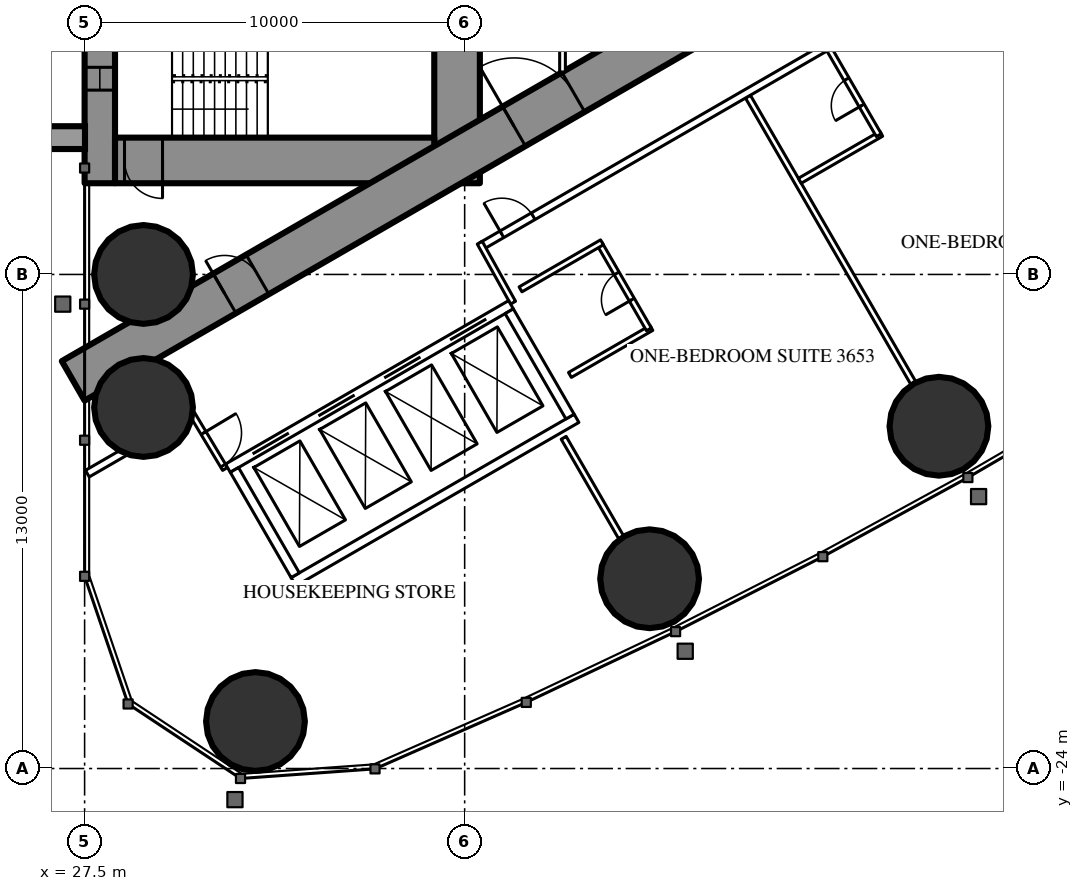
"""IFC4 building model, lengths in metres.
Left out: names, types, materials, properties, quantities, classifications, styles, units other than length and angle.
Written with IfcOpenShell. Run it as: python <this file> out.ifc"""

import sys

from ifc_helpers import new_model, si_unit, direction, frame, frame_2d, origin, origin_2d, place, context, subcontext, project, spatial, rectangle, hollow_circle, extrude, element, fill, save


model = new_model("IFC4")
c1 = context("Model", 3, precision=1e-05, world=origin(), true_north=direction((0.0, 1.0)))
c2 = subcontext(c1, "Body", "Model", "MODEL_VIEW")
j1 = project(units=[si_unit("LENGTHUNIT", "METRE"), si_unit("PLANEANGLEUNIT", "RADIAN")], contexts=[c1])
p1 = place(None, origin())
s1 = spatial("IfcSite", under=j1, at=p1, CompositionType="ELEMENT")
p2 = place(p1, origin())
s2 = spatial("IfcBuilding", under=s1, at=p2, CompositionType="ELEMENT")
p3 = place(p2, frame((0.0, 0.0, 136.1)))
s3 = spatial("IfcBuildingStorey", under=s2, at=p3, CompositionType="ELEMENT", Elevation=136.1)
for number, where, z_axis, x_axis in (
    (1, (31.996, -22.763, 0.0), (0.0, 0.0, 1.0), (1.0, 0.0, 0.0)),
    (2, (29.05, -11.0, 0.0), (0.0, 0.0, 1.0), (1.0, 0.0, 0.0)),
    (3, (29.05, -14.5, 0.0), (0.0, 0.0, 1.0), (1.0, 0.0, 0.0)),
    (4, (42.366, -19.007, 0.0), (0.0, 0.0, 1.0), (1.0, 0.0, 0.0)),
    (5, (49.979, -14.994, 0.0), (0.0, 0.0, 1.0), (1.0, 0.0, 0.0)),
):
    element("IfcColumn", number, at=place(p3, frame(where, z_axis=z_axis, x_axis=x_axis)), inside=s3, PredefinedType="COLUMN", context=c2, shape_type="SweptSolid", body=[
        extrude(hollow_circle(Radius=1.3, WallThickness=0.1, at=origin_2d()), origin(), (0.0, 0.0, 1.0), 3.5),
    ])
p4 = place(p3, frame((27.9, -8.6, 0.0), z_axis=(0.0, 0.0, 1.0), x_axis=(0.0, 1.0, 0.0)))
e6 = element("IfcWall", 6, at=p4, inside=s3, PredefinedType="SHEAR", context=c2, shape_type="SweptSolid", body=[
    extrude(rectangle(XDim=17.2, YDim=0.8, at=frame_2d((8.6, 0.0))), origin(), (0.0, 0.0, 1.0), 3.5),
])
p5 = place(p4, frame((2.45, 0.0, 0.6)))
e7 = element("IfcOpeningElement", 7, at=p5, cuts=e6, PredefinedType="OPENING", context=c2, shape_type="SweptSolid", body=[
    extrude(rectangle(XDim=0.6, YDim=2.1, at=frame_2d((0.3, 1.05))), frame((0.0, 0.41, 0.0), z_axis=(0.0, -1.0, 0.0), x_axis=(1.0, 0.0, 0.0)), (0.0, 0.0, 1.0), 0.82),
])
p6 = place(p4, frame((14.15, 0.0, 0.6)))
e8 = element("IfcOpeningElement", 8, at=p6, cuts=e6, PredefinedType="OPENING", context=c2, shape_type="SweptSolid", body=[
    extrude(rectangle(XDim=0.6, YDim=2.1, at=frame_2d((0.3, 1.05))), frame((0.0, 0.41, 0.0), z_axis=(0.0, -1.0, 0.0), x_axis=(1.0, 0.0, 0.0)), (0.0, 0.0, 1.0), 0.82),
])
p7 = place(p3, frame((37.3, -8.6, 0.0), z_axis=(0.0, 0.0, 1.0), x_axis=(0.0, 1.0, 0.0)))
e9 = element("IfcWall", 9, at=p7, inside=s3, PredefinedType="SHEAR", context=c2, shape_type="SweptSolid", body=[
    extrude(rectangle(XDim=17.2, YDim=1.2, at=frame_2d((8.6, 0.0))), origin(), (0.0, 0.0, 1.0), 3.5),
])
p8 = place(p7, frame((7.7, 0.0, 0.0)))
e10 = element("IfcOpeningElement", 10, at=p8, cuts=e9, PredefinedType="OPENING", context=c2, shape_type="SweptSolid", body=[
    extrude(rectangle(XDim=1.8, YDim=2.2, at=frame_2d((0.9, 1.1))), frame((0.0, 0.61, 0.0), z_axis=(0.0, -1.0, 0.0), x_axis=(1.0, 0.0, 0.0)), (0.0, 0.0, 1.0), 1.22),
])
p9 = place(p3, frame((28.3, -8.0, 0.0), z_axis=(0.0, 0.0, 1.0), x_axis=(1.0, 0.0, 0.0)))
e11 = element("IfcWall", 11, at=p9, inside=s3, PredefinedType="SHEAR", context=c2, shape_type="SweptSolid", body=[
    extrude(rectangle(XDim=8.4, YDim=1.2, at=frame_2d((4.2, 0.0))), origin(), (0.0, 0.0, 1.0), 3.5),
])
p10 = place(p9, frame((0.25, 0.0, 0.0)))
e12 = element("IfcOpeningElement", 12, at=p10, cuts=e11, PredefinedType="OPENING", context=c2, shape_type="SweptSolid", body=[
    extrude(rectangle(XDim=1.0, YDim=2.2, at=frame_2d((0.5, 1.1))), frame((0.0, 0.61, 0.0), z_axis=(0.0, -1.0, 0.0), x_axis=(1.0, 0.0, 0.0)), (0.0, 0.0, 1.0), 1.22),
])
p11 = place(p3, frame((27.2, -13.8, 0.0), z_axis=(0.0, 0.0, 1.0), x_axis=(0.866027159892, 0.499996958321, 0.0)))
e13 = element("IfcWall", 13, at=p11, inside=s3, PredefinedType="SHEAR", context=c2, shape_type="SweptSolid", body=[
    extrude(rectangle(XDim=27.947, YDim=1.2, at=frame_2d((13.973, 0.0))), origin(), (0.0, 0.0, 1.0), 3.5),
])
p12 = place(p11, frame((4.6, 0.0, 0.0)))
e14 = element("IfcOpeningElement", 14, at=p12, cuts=e13, PredefinedType="OPENING", context=c2, shape_type="SweptSolid", body=[
    extrude(rectangle(XDim=1.0, YDim=2.2, at=frame_2d((0.5, 1.1))), frame((0.0, 0.61, 0.0), z_axis=(0.0, -1.0, 0.0), x_axis=(1.0, 0.0, 0.0)), (0.0, 0.0, 1.0), 1.22),
])
p13 = place(p11, frame((13.395, 0.0, 0.0)))
e15 = element("IfcOpeningElement", 15, at=p13, cuts=e13, PredefinedType="OPENING", context=c2, shape_type="SweptSolid", body=[
    extrude(rectangle(XDim=1.8, YDim=2.2, at=frame_2d((0.9, 1.1))), frame((0.0, 0.61, 0.0), z_axis=(0.0, -1.0, 0.0), x_axis=(1.0, 0.0, 0.0)), (0.0, 0.0, 1.0), 1.22),
])
p14 = place(p3, frame((44.954, -6.321, 0.0), z_axis=(0.0, 0.0, 1.0), x_axis=(0.500018676722, -0.866014620505, 0.0)))
e16 = element("IfcWall", 16, at=p14, inside=s3, PredefinedType="PARTITIONING", context=c2, shape_type="SweptSolid", body=[
    extrude(rectangle(XDim=8.704, YDim=0.15, at=frame_2d((4.352, 0.0))), origin(), (0.0, 0.0, 1.0), 2.2),
])
p15 = place(p3, frame((40.105, -15.299, 0.0), z_axis=(0.0, 0.0, 1.0), x_axis=(0.499978822259, -0.866037630414, 0.0)))
e17 = element("IfcWall", 17, at=p15, inside=s3, PredefinedType="PARTITIONING", context=c2, shape_type="SweptSolid", body=[
    extrude(rectangle(XDim=3.023, YDim=0.15, at=frame_2d((1.511, 0.0))), origin(), (0.0, 0.0, 1.0), 3.25),
])
p16 = place(p3, frame((27.572, -16.241, 0.0), z_axis=(0.0, 0.0, 1.0), x_axis=(0.866029654818, 0.499992636921, 0.0)))
e18 = element("IfcWall", 18, at=p16, inside=s3, PredefinedType="PARTITIONING", context=c2, shape_type="SweptSolid", body=[
    extrude(rectangle(XDim=3.155, YDim=0.2, at=frame_2d((1.577, 0.0))), origin(), (0.0, 0.0, 1.0), 3.25),
])
p17 = place(p3, frame((37.96, -10.243, 0.0), z_axis=(0.0, 0.0, 1.0), x_axis=(0.866026429433, 0.499998223521, 0.0)))
e19 = element("IfcWall", 19, at=p17, inside=s3, PredefinedType="PARTITIONING", context=c2, shape_type="SweptSolid", body=[
    extrude(rectangle(XDim=20.487, YDim=0.2, at=frame_2d((10.243, 0.0))), origin(), (0.0, 0.0, 1.0), 3.25),
])
p18 = place(p17, frame((10.743, 0.0, 0.0)))
e20 = element("IfcOpeningElement", 20, at=p18, cuts=e19, PredefinedType="OPENING", context=c2, shape_type="SweptSolid", body=[
    extrude(rectangle(XDim=0.95, YDim=2.2, at=frame_2d((0.475, 1.1))), frame((0.0, 0.11, 0.0), z_axis=(0.0, -1.0, 0.0), x_axis=(1.0, 0.0, 0.0)), (0.0, 0.0, 1.0), 0.22),
])
p19 = place(p17, frame((17.586, 0.0, 0.0)))
e21 = element("IfcOpeningElement", 21, at=p19, cuts=e19, PredefinedType="OPENING", context=c2, shape_type="SweptSolid", body=[
    extrude(rectangle(XDim=1.8, YDim=2.2, at=frame_2d((0.9, 1.1))), frame((0.0, 0.11, 0.0), z_axis=(0.0, -1.0, 0.0), x_axis=(1.0, 0.0, 0.0)), (0.0, 0.0, 1.0), 0.22),
])
p20 = place(p17, frame((0.6, 0.0, 0.0)))
e22 = element("IfcOpeningElement", 22, at=p20, cuts=e19, PredefinedType="OPENING", context=c2, shape_type="SweptSolid", body=[
    extrude(rectangle(XDim=0.95, YDim=2.2, at=frame_2d((0.475, 1.1))), frame((0.0, 0.11, 0.0), z_axis=(0.0, -1.0, 0.0), x_axis=(1.0, 0.0, 0.0)), (0.0, 0.0, 1.0), 0.22),
])
p21 = place(p3, frame((38.773, -11.742, 0.0), z_axis=(0.0, 0.0, 1.0), x_axis=(-0.485528096672, 0.8742210632, 0.0)))
e23 = element("IfcWall", 23, at=p21, inside=s3, PredefinedType="PARTITIONING", context=c2, shape_type="SweptSolid", body=[
    extrude(rectangle(XDim=1.805, YDim=0.15, at=frame_2d((0.903, 0.0))), origin(), (0.0, 0.0, 1.0), 3.25),
])
p22 = place(p3, frame((30.267, -14.569, 0.0), z_axis=(0.0, 0.0, 1.0), x_axis=(0.514336634837, -0.857588377991, 0.0)))
e24 = element("IfcWall", 24, at=p22, inside=s3, PredefinedType="PARTITIONING", context=c2, shape_type="SweptSolid", body=[
    extrude(rectangle(XDim=1.805, YDim=0.15, at=frame_2d((0.903, 0.0))), origin(), (0.0, 0.0, 1.0), 3.25),
])
p23 = place(p22, frame((0.703, 0.0, 0.0)))
e25 = element("IfcOpeningElement", 25, at=p23, cuts=e24, PredefinedType="OPENING", context=c2, shape_type="SweptSolid", body=[
    extrude(rectangle(XDim=1.0, YDim=2.2, at=frame_2d((0.5, 1.1))), frame((0.0, 0.085, 0.0), z_axis=(0.0, -1.0, 0.0), x_axis=(1.0, 0.0, 0.0)), (0.0, 0.0, 1.0), 0.17),
])
p24 = place(p3, frame((46.319, -8.535, 0.0), z_axis=(0.0, 0.0, 1.0), x_axis=(0.866006523861, 0.500032699561, 0.0)))
e26 = element("IfcWall", 26, at=p24, inside=s3, PredefinedType="PARTITIONING", context=c2, shape_type="SweptSolid", body=[
    extrude(rectangle(XDim=2.475, YDim=0.15, at=frame_2d((1.237, 0.0))), origin(), (0.0, 0.0, 1.0), 3.25),
])
p25 = place(p3, frame((47.097, -5.084, 0.0), z_axis=(0.0, 0.0, 1.0), x_axis=(0.500006934395, -0.866021400173, 0.0)))
e27 = element("IfcWall", 27, at=p25, inside=s3, PredefinedType="PARTITIONING", context=c2, shape_type="SweptSolid", body=[
    extrude(rectangle(XDim=2.6, YDim=0.15, at=frame_2d((1.3, 0.0))), origin(), (0.0, 0.0, 1.0), 3.25),
])
p26 = place(p25, frame((0.9, 0.0, 0.0)))
e28 = element("IfcOpeningElement", 28, at=p26, cuts=e27, PredefinedType="OPENING", context=c2, shape_type="SweptSolid", body=[
    extrude(rectangle(XDim=0.8, YDim=2.2, at=frame_2d((0.4, 1.1))), frame((0.0, 0.085, 0.0), z_axis=(0.0, -1.0, 0.0), x_axis=(1.0, 0.0, 0.0)), (0.0, 0.0, 1.0), 0.17),
])
p27 = place(p3, frame((40.27, -13.644, 0.0), z_axis=(0.0, 0.0, 1.0), x_axis=(0.866031185235, 0.4999899861, 0.0)))
e29 = element("IfcWall", 29, at=p27, inside=s3, PredefinedType="PARTITIONING", context=c2, shape_type="SweptSolid", body=[
    extrude(rectangle(XDim=2.475, YDim=0.15, at=frame_2d((1.238, 0.0))), origin(), (0.0, 0.0, 1.0), 3.25),
])
p28 = place(p3, frame((41.048, -10.193, 0.0), z_axis=(0.0, 0.0, 1.0), x_axis=(0.500047596559, -0.865997922154, 0.0)))
e30 = element("IfcWall", 30, at=p28, inside=s3, PredefinedType="PARTITIONING", context=c2, shape_type="SweptSolid", body=[
    extrude(rectangle(XDim=2.6, YDim=0.15, at=frame_2d((1.3, 0.0))), origin(), (0.0, 0.0, 1.0), 3.25),
])
p29 = place(p28, frame((0.9, 0.0, 0.0)))
e31 = element("IfcOpeningElement", 31, at=p29, cuts=e30, PredefinedType="OPENING", context=c2, shape_type="SweptSolid", body=[
    extrude(rectangle(XDim=0.8, YDim=2.2, at=frame_2d((0.4, 1.1))), frame((0.0, 0.085, 0.0), z_axis=(0.0, -1.0, 0.0), x_axis=(1.0, 0.0, 0.0)), (0.0, 0.0, 1.0), 0.17),
])
p30 = place(p3, frame((38.97, -11.393, 0.0), z_axis=(0.0, 0.0, 1.0), x_axis=(0.866031185235, 0.4999899861, 0.0)))
e32 = element("IfcWall", 32, at=p30, inside=s3, PredefinedType="PARTITIONING", context=c2, shape_type="SweptSolid", body=[
    extrude(rectangle(XDim=2.475, YDim=0.15, at=frame_2d((1.238, 0.0))), origin(), (0.0, 0.0, 1.0), 3.25),
])
p31 = place(p3, frame((40.075, -5.674, 0.0), z_axis=(0.0, 0.0, 1.0), x_axis=(0.0, 1.0, 0.0)))
e33 = element("IfcWall", 33, at=p31, inside=s3, PredefinedType="PARTITIONING", context=c2, shape_type="SweptSolid", body=[
    extrude(rectangle(XDim=6.874, YDim=0.15, at=frame_2d((3.437, 0.0))), origin(), (0.0, 0.0, 1.0), 3.25),
])
p32 = place(p31, frame((2.537, 0.0, 0.0)))
e34 = element("IfcOpeningElement", 34, at=p32, cuts=e33, PredefinedType="OPENING", context=c2, shape_type="SweptSolid", body=[
    extrude(rectangle(XDim=1.8, YDim=2.2, at=frame_2d((0.9, 1.1))), frame((0.0, 0.085, 0.0), z_axis=(0.0, -1.0, 0.0), x_axis=(1.0, 0.0, 0.0)), (0.0, 0.0, 1.0), 0.17),
])
p33 = place(p3, frame((31.271, -16.097, 0.0), z_axis=(0.0, 0.0, 1.0), x_axis=(0.86604045752, 0.499973925258, 0.0)))
e35 = element("IfcWall", 35, at=p33, inside=s3, PredefinedType="PARTITIONING", context=c2, shape_type="SweptSolid", body=[
    extrude(rectangle(XDim=8.6, YDim=0.25, at=frame_2d((4.3, 0.0))), origin(), (0.0, 0.0, 1.0), 3.25),
])
p34 = place(p33, frame((0.75, 0.0, 0.0)))
e36 = element("IfcOpeningElement", 36, at=p34, cuts=e35, PredefinedType="OPENING", context=c2, shape_type="SweptSolid", body=[
    extrude(rectangle(XDim=1.1, YDim=2.2, at=frame_2d((0.55, 1.1))), frame((0.0, 0.135, 0.0), z_axis=(0.0, -1.0, 0.0), x_axis=(1.0, 0.0, 0.0)), (0.0, 0.0, 1.0), 0.27),
])
p35 = place(p33, frame((2.75, 0.0, 0.0)))
e37 = element("IfcOpeningElement", 37, at=p35, cuts=e35, PredefinedType="OPENING", context=c2, shape_type="SweptSolid", body=[
    extrude(rectangle(XDim=1.1, YDim=2.2, at=frame_2d((0.55, 1.1))), frame((0.0, 0.135, 0.0), z_axis=(0.0, -1.0, 0.0), x_axis=(1.0, 0.0, 0.0)), (0.0, 0.0, 1.0), 0.27),
])
p36 = place(p33, frame((4.75, 0.0, 0.0)))
e38 = element("IfcOpeningElement", 38, at=p36, cuts=e35, PredefinedType="OPENING", context=c2, shape_type="SweptSolid", body=[
    extrude(rectangle(XDim=1.1, YDim=2.2, at=frame_2d((0.55, 1.1))), frame((0.0, 0.135, 0.0), z_axis=(0.0, -1.0, 0.0), x_axis=(1.0, 0.0, 0.0)), (0.0, 0.0, 1.0), 0.27),
])
p37 = place(p33, frame((6.75, 0.0, 0.0)))
e39 = element("IfcOpeningElement", 39, at=p37, cuts=e35, PredefinedType="OPENING", context=c2, shape_type="SweptSolid", body=[
    extrude(rectangle(XDim=1.1, YDim=2.2, at=frame_2d((0.55, 1.1))), frame((0.0, 0.135, 0.0), z_axis=(0.0, -1.0, 0.0), x_axis=(1.0, 0.0, 0.0)), (0.0, 0.0, 1.0), 0.27),
])
p38 = place(p3, frame((32.996, -19.086, 0.0), z_axis=(0.0, 0.0, 1.0), x_axis=(0.866028165386, 0.499995216735, 0.0)))
e40 = element("IfcWall", 40, at=p38, inside=s3, PredefinedType="PARTITIONING", context=c2, shape_type="SweptSolid", body=[
    extrude(rectangle(XDim=8.6, YDim=0.25, at=frame_2d((4.3, 0.0))), origin(), (0.0, 0.0, 1.0), 3.25),
])
for number, where, z_axis, x_axis in (
    (41, (31.441, -16.143, 0.0), (0.0, 0.0, 1.0), (0.5, -0.866, 0.0)),
    (42, (38.673, -11.968, 0.0), (0.0, 0.0, 1.0), (0.5, -0.866, 0.0)),
):
    element("IfcWall", number, at=place(p3, frame(where, z_axis=z_axis, x_axis=x_axis)), inside=s3, PredefinedType="PARTITIONING", context=c2, shape_type="SweptSolid", body=[
        extrude(rectangle(XDim=3.201, YDim=0.25, at=frame_2d((1.6, 0.0))), origin(), (0.0, 0.0, 1.0), 3.25),
    ])
p39 = place(p26, origin())
e43 = element("IfcDoor", 43, at=p39, inside=s3, OperationType="SINGLE_SWING_RIGHT", PredefinedType="DOOR", context=c2, shape_type="SweptSolid", body=[
    extrude(rectangle(XDim=0.8, YDim=2.2, at=frame_2d((0.4, 1.1))), frame((0.0, 0.025, 0.0), z_axis=(0.0, -1.0, 0.0), x_axis=(1.0, 0.0, 0.0)), (0.0, 0.0, 1.0), 0.05),
])
fill(e28, e43)
p40 = place(p29, origin())
e44 = element("IfcDoor", 44, at=p40, inside=s3, OperationType="SINGLE_SWING_RIGHT", PredefinedType="DOOR", context=c2, shape_type="SweptSolid", body=[
    extrude(rectangle(XDim=0.8, YDim=2.2, at=frame_2d((0.4, 1.1))), frame((0.0, 0.025, 0.0), z_axis=(0.0, -1.0, 0.0), x_axis=(1.0, 0.0, 0.0)), (0.0, 0.0, 1.0), 0.05),
])
fill(e31, e44)
p41 = place(p20, origin())
e45 = element("IfcDoor", 45, at=p41, inside=s3, OperationType="SINGLE_SWING_LEFT", PredefinedType="DOOR", context=c2, shape_type="SweptSolid", body=[
    extrude(rectangle(XDim=0.95, YDim=2.2, at=frame_2d((0.475, 1.1))), frame((0.0, 0.025, 0.0), z_axis=(0.0, -1.0, 0.0), x_axis=(1.0, 0.0, 0.0)), (0.0, 0.0, 1.0), 0.05),
])
fill(e22, e45)
p42 = place(p23, origin())
e46 = element("IfcDoor", 46, at=p42, inside=s3, OperationType="SINGLE_SWING_LEFT", PredefinedType="DOOR", context=c2, shape_type="SweptSolid", body=[
    extrude(rectangle(XDim=1.0, YDim=2.2, at=frame_2d((0.5, 1.1))), frame((0.0, 0.025, 0.0), z_axis=(0.0, -1.0, 0.0), x_axis=(1.0, 0.0, 0.0)), (0.0, 0.0, 1.0), 0.05),
])
fill(e25, e46)
p43 = place(p12, origin())
e47 = element("IfcDoor", 47, at=p43, inside=s3, OperationType="SINGLE_SWING_LEFT", PredefinedType="DOOR", context=c2, shape_type="SweptSolid", body=[
    extrude(rectangle(XDim=1.0, YDim=2.2, at=frame_2d((0.5, 1.1))), frame((0.0, 0.025, 0.0), z_axis=(0.0, -1.0, 0.0), x_axis=(1.0, 0.0, 0.0)), (0.0, 0.0, 1.0), 0.05),
])
fill(e14, e47)
p44 = place(p13, origin())
e48 = element("IfcDoor", 48, at=p44, inside=s3, OperationType="DOUBLE_DOOR_SINGLE_SWING", PredefinedType="DOOR", context=c2, shape_type="SweptSolid", body=[
    extrude(rectangle(XDim=1.8, YDim=2.2, at=frame_2d((0.9, 1.1))), frame((0.0, 0.025, 0.0), z_axis=(0.0, -1.0, 0.0), x_axis=(1.0, 0.0, 0.0)), (0.0, 0.0, 1.0), 0.05),
])
fill(e15, e48)
p45 = place(p10, origin())
e49 = element("IfcDoor", 49, at=p45, inside=s3, OperationType="SINGLE_SWING_RIGHT", PredefinedType="DOOR", context=c2, shape_type="SweptSolid", body=[
    extrude(rectangle(XDim=1.0, YDim=2.2, at=frame_2d((0.5, 1.1))), frame((0.0, 0.025, 0.0), z_axis=(0.0, -1.0, 0.0), x_axis=(1.0, 0.0, 0.0)), (0.0, 0.0, 1.0), 0.05),
])
fill(e12, e49)
p46 = place(p34, origin())
e50 = element("IfcDoor", 50, at=p46, inside=s3, OperationType="DOUBLE_DOOR_SLIDING", PredefinedType="USERDEFINED", context=c2, shape_type="SweptSolid", body=[
    extrude(rectangle(XDim=1.1, YDim=2.2, at=frame_2d((0.55, 1.1))), frame((0.0, 0.025, 0.0), z_axis=(0.0, -1.0, 0.0), x_axis=(1.0, 0.0, 0.0)), (0.0, 0.0, 1.0), 0.05),
])
fill(e36, e50)
p47 = place(p35, origin())
e51 = element("IfcDoor", 51, at=p47, inside=s3, OperationType="DOUBLE_DOOR_SLIDING", PredefinedType="USERDEFINED", context=c2, shape_type="SweptSolid", body=[
    extrude(rectangle(XDim=1.1, YDim=2.2, at=frame_2d((0.55, 1.1))), frame((0.0, 0.025, 0.0), z_axis=(0.0, -1.0, 0.0), x_axis=(1.0, 0.0, 0.0)), (0.0, 0.0, 1.0), 0.05),
])
fill(e37, e51)
p48 = place(p36, origin())
e52 = element("IfcDoor", 52, at=p48, inside=s3, OperationType="DOUBLE_DOOR_SLIDING", PredefinedType="USERDEFINED", context=c2, shape_type="SweptSolid", body=[
    extrude(rectangle(XDim=1.1, YDim=2.2, at=frame_2d((0.55, 1.1))), frame((0.0, 0.025, 0.0), z_axis=(0.0, -1.0, 0.0), x_axis=(1.0, 0.0, 0.0)), (0.0, 0.0, 1.0), 0.05),
])
fill(e38, e52)
p49 = place(p37, origin())
e53 = element("IfcDoor", 53, at=p49, inside=s3, OperationType="DOUBLE_DOOR_SLIDING", PredefinedType="USERDEFINED", context=c2, shape_type="SweptSolid", body=[
    extrude(rectangle(XDim=1.1, YDim=2.2, at=frame_2d((0.55, 1.1))), frame((0.0, 0.025, 0.0), z_axis=(0.0, -1.0, 0.0), x_axis=(1.0, 0.0, 0.0)), (0.0, 0.0, 1.0), 0.05),
])
fill(e39, e53)
p50 = place(p5, origin())
e54 = element("IfcWindow", 54, at=p50, inside=s3, PartitioningType="SINGLE_PANEL", PredefinedType="WINDOW", context=c2, shape_type="SweptSolid", body=[
    extrude(rectangle(XDim=0.6, YDim=2.1, at=frame_2d((0.3, 1.05))), frame((0.0, 0.03, 0.0), z_axis=(0.0, -1.0, 0.0), x_axis=(1.0, 0.0, 0.0)), (0.0, 0.0, 1.0), 0.06),
])
fill(e7, e54)
save(model, sys.argv[1])
